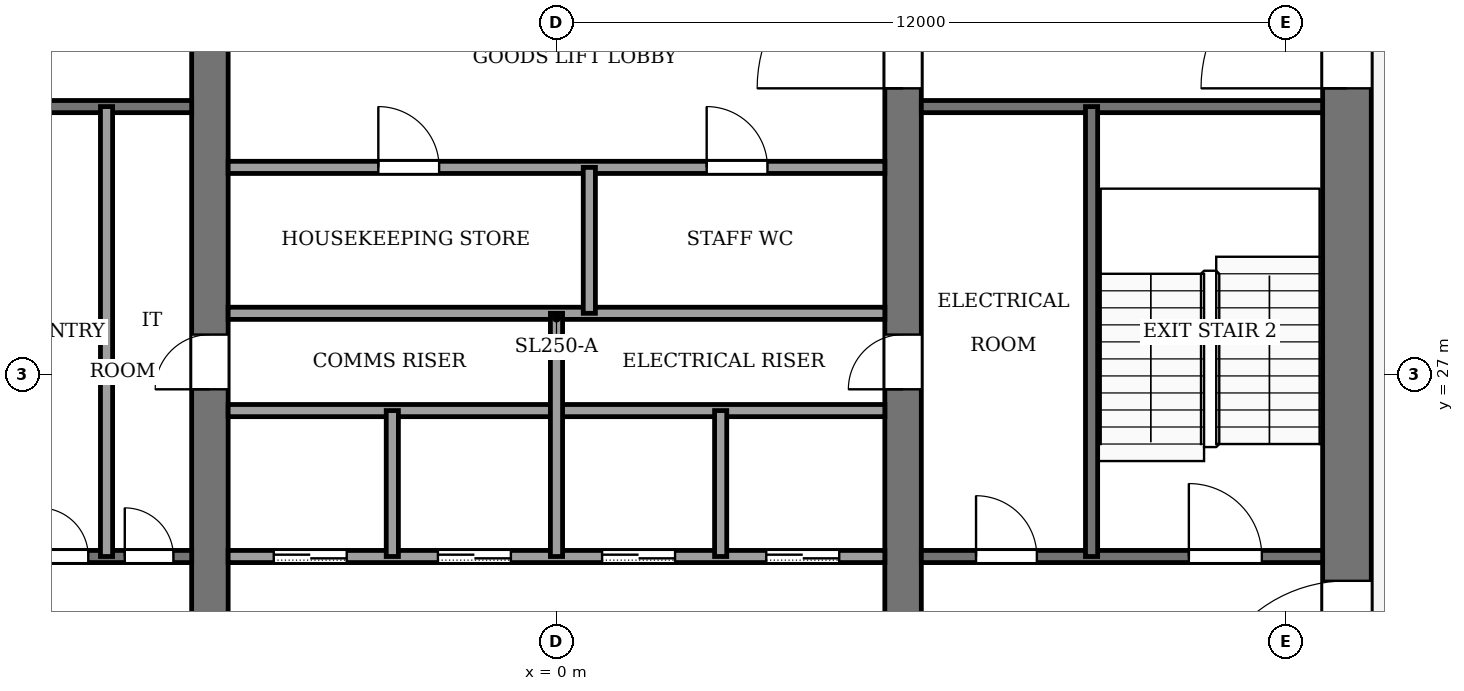
"""IFC4 building model, lengths in metres.
Left out: names, types, materials, properties, quantities, classifications, styles, units other than length and angle.
Written with IfcOpenShell. Run it as: python <this file> out.ifc"""

import sys

from ifc_helpers import new_model, si_unit, direction, frame, frame_2d, origin, place, context, subcontext, project, spatial, rectangle, extrude, element, fill, save


model = new_model("IFC4")
c1 = context("Model", 3, precision=1e-05, world=origin(), true_north=direction((0.0, 1.0)))
c2 = subcontext(c1, "Body", "Model", "MODEL_VIEW")
j1 = project(units=[si_unit("LENGTHUNIT", "METRE"), si_unit("PLANEANGLEUNIT", "RADIAN")], contexts=[c1])
p1 = place(None, origin())
s1 = spatial("IfcSite", under=j1, at=p1, CompositionType="ELEMENT")
p2 = place(p1, origin())
s2 = spatial("IfcBuilding", under=s1, at=p2, CompositionType="ELEMENT")
p3 = place(p2, frame((0.0, 0.0, 242.0)))
s3 = spatial("IfcBuildingStorey", under=s2, at=p3, CompositionType="ELEMENT", Elevation=242.0)
p4 = place(p3, frame((13.0, 18.4, -0.13), z_axis=(0.0, 0.0, 1.0), x_axis=(0.0, 1.0, 0.0)))
e1 = element("IfcWall", 1, at=p4, inside=s3, PredefinedType="SHEAR", context=c2, shape_type="SweptSolid", body=[
    extrude(rectangle(XDim=19.2, YDim=0.8, at=frame_2d((9.6, 0.0))), origin(), (0.0, 0.0, 1.0), 4.0),
])
p5 = place(p4, frame((2.8, 0.0, 0.13)))
e2 = element("IfcOpeningElement", 2, at=p5, cuts=e1, PredefinedType="OPENING", context=c2, shape_type="SweptSolid", body=[
    extrude(rectangle(XDim=2.4, YDim=2.4, at=frame_2d((1.2, 1.2))), frame((0.0, 0.41, 0.0), z_axis=(0.0, -1.0, 0.0), x_axis=(1.0, 0.0, 0.0)), (0.0, 0.0, 1.0), 0.82),
])
p6 = place(p4, frame((13.3, 0.0, 0.13)))
e3 = element("IfcOpeningElement", 3, at=p6, cuts=e1, PredefinedType="OPENING", context=c2, shape_type="SweptSolid", body=[
    extrude(rectangle(XDim=2.4, YDim=2.4, at=frame_2d((1.2, 1.2))), frame((0.0, 0.41, 0.0), z_axis=(0.0, -1.0, 0.0), x_axis=(1.0, 0.0, 0.0)), (0.0, 0.0, 1.0), 0.82),
])
p7 = place(p3, frame((-5.7, 18.4, -0.13), z_axis=(0.0, 0.0, 1.0), x_axis=(0.0, 1.0, 0.0)))
e4 = element("IfcWall", 4, at=p7, inside=s3, PredefinedType="SHEAR", context=c2, shape_type="SweptSolid", body=[
    extrude(rectangle(XDim=19.2, YDim=0.6, at=frame_2d((9.6, 0.0))), origin(), (0.0, 0.0, 1.0), 4.0),
])
p8 = place(p7, frame((8.35, 0.0, 0.13)))
e5 = element("IfcOpeningElement", 5, at=p8, cuts=e4, PredefinedType="OPENING", context=c2, shape_type="SweptSolid", body=[
    extrude(rectangle(XDim=0.9, YDim=2.1, at=frame_2d((0.45, 1.05))), frame((0.0, 0.31, 0.0), z_axis=(0.0, -1.0, 0.0), x_axis=(1.0, 0.0, 0.0)), (0.0, 0.0, 1.0), 0.62),
])
p9 = place(p3, frame((5.7, 18.4, -0.13), z_axis=(0.0, 0.0, 1.0), x_axis=(0.0, 1.0, 0.0)))
e6 = element("IfcWall", 6, at=p9, inside=s3, PredefinedType="SHEAR", context=c2, shape_type="SweptSolid", body=[
    extrude(rectangle(XDim=19.2, YDim=0.6, at=frame_2d((9.6, 0.0))), origin(), (0.0, 0.0, 1.0), 4.0),
])
p10 = place(p9, frame((8.35, 0.0, 0.13)))
e7 = element("IfcOpeningElement", 7, at=p10, cuts=e6, PredefinedType="OPENING", context=c2, shape_type="SweptSolid", body=[
    extrude(rectangle(XDim=0.9, YDim=2.1, at=frame_2d((0.45, 1.05))), frame((0.0, 0.31, 0.0), z_axis=(0.0, -1.0, 0.0), x_axis=(1.0, 0.0, 0.0)), (0.0, 0.0, 1.0), 0.62),
])
p11 = place(p9, frame((13.3, 0.0, 0.13)))
e8 = element("IfcOpeningElement", 8, at=p11, cuts=e6, PredefinedType="OPENING", context=c2, shape_type="SweptSolid", body=[
    extrude(rectangle(XDim=2.4, YDim=2.4, at=frame_2d((1.2, 1.2))), frame((0.0, 0.31, 0.0), z_axis=(0.0, -1.0, 0.0), x_axis=(1.0, 0.0, 0.0)), (0.0, 0.0, 1.0), 0.62),
])
p12 = place(p3, frame((-12.6, 24.0, 0.0), z_axis=(0.0, 0.0, 1.0), x_axis=(1.0, 0.0, 0.0)))
e9 = element("IfcWall", 9, at=p12, inside=s3, PredefinedType="PARTITIONING", context=c2, shape_type="SweptSolid", body=[
    extrude(rectangle(XDim=6.6, YDim=0.2, at=frame_2d((3.3, 0.0))), origin(), (0.0, 0.0, 1.0), 3.87),
])
p13 = place(p12, frame((4.1, 0.0, 0.0)))
e10 = element("IfcOpeningElement", 10, at=p13, cuts=e9, PredefinedType="OPENING", context=c2, shape_type="SweptSolid", body=[
    extrude(rectangle(XDim=0.8, YDim=2.1, at=frame_2d((0.4, 1.05))), frame((0.0, 0.11, 0.0), z_axis=(0.0, -1.0, 0.0), x_axis=(1.0, 0.0, 0.0)), (0.0, 0.0, 1.0), 0.22),
])
p14 = place(p12, frame((5.5, 0.0, 0.0)))
e11 = element("IfcOpeningElement", 11, at=p14, cuts=e9, PredefinedType="OPENING", context=c2, shape_type="SweptSolid", body=[
    extrude(rectangle(XDim=0.8, YDim=2.1, at=frame_2d((0.4, 1.05))), frame((0.0, 0.11, 0.0), z_axis=(0.0, -1.0, 0.0), x_axis=(1.0, 0.0, 0.0)), (0.0, 0.0, 1.0), 0.22),
])
p15 = place(p3, frame((-5.4, 24.0, 0.0), z_axis=(0.0, 0.0, 1.0), x_axis=(1.0, 0.0, 0.0)))
e12 = element("IfcWall", 12, at=p15, inside=s3, PredefinedType="PARTITIONING", context=c2, shape_type="SweptSolid", body=[
    extrude(rectangle(XDim=10.8, YDim=0.2, at=frame_2d((5.4, 0.0))), origin(), (0.0, 0.0, 1.0), 3.87),
])
p16 = place(p15, frame((0.75, 0.0, 0.0)))
e13 = element("IfcOpeningElement", 13, at=p16, cuts=e12, PredefinedType="OPENING", context=c2, shape_type="SweptSolid", body=[
    extrude(rectangle(XDim=1.2, YDim=2.2, at=frame_2d((0.6, 1.1))), frame((0.0, 0.11, 0.0), z_axis=(0.0, -1.0, 0.0), x_axis=(1.0, 0.0, 0.0)), (0.0, 0.0, 1.0), 0.22),
])
p17 = place(p15, frame((3.45, 0.0, 0.0)))
e14 = element("IfcOpeningElement", 14, at=p17, cuts=e12, PredefinedType="OPENING", context=c2, shape_type="SweptSolid", body=[
    extrude(rectangle(XDim=1.2, YDim=2.2, at=frame_2d((0.6, 1.1))), frame((0.0, 0.11, 0.0), z_axis=(0.0, -1.0, 0.0), x_axis=(1.0, 0.0, 0.0)), (0.0, 0.0, 1.0), 0.22),
])
p18 = place(p15, frame((6.15, 0.0, 0.0)))
e15 = element("IfcOpeningElement", 15, at=p18, cuts=e12, PredefinedType="OPENING", context=c2, shape_type="SweptSolid", body=[
    extrude(rectangle(XDim=1.2, YDim=2.2, at=frame_2d((0.6, 1.1))), frame((0.0, 0.11, 0.0), z_axis=(0.0, -1.0, 0.0), x_axis=(1.0, 0.0, 0.0)), (0.0, 0.0, 1.0), 0.22),
])
p19 = place(p15, frame((8.85, 0.0, 0.0)))
e16 = element("IfcOpeningElement", 16, at=p19, cuts=e12, PredefinedType="OPENING", context=c2, shape_type="SweptSolid", body=[
    extrude(rectangle(XDim=1.2, YDim=2.2, at=frame_2d((0.6, 1.1))), frame((0.0, 0.11, 0.0), z_axis=(0.0, -1.0, 0.0), x_axis=(1.0, 0.0, 0.0)), (0.0, 0.0, 1.0), 0.22),
])
p20 = place(p3, frame((6.0, 24.0, 0.0), z_axis=(0.0, 0.0, 1.0), x_axis=(1.0, 0.0, 0.0)))
e17 = element("IfcWall", 17, at=p20, inside=s3, PredefinedType="PARTITIONING", context=c2, shape_type="SweptSolid", body=[
    extrude(rectangle(XDim=6.6, YDim=0.2, at=frame_2d((3.3, 0.0))), origin(), (0.0, 0.0, 1.0), 3.87),
])
p21 = place(p20, frame((0.9, 0.0, 0.0)))
e18 = element("IfcOpeningElement", 18, at=p21, cuts=e17, PredefinedType="OPENING", context=c2, shape_type="SweptSolid", body=[
    extrude(rectangle(XDim=1.0, YDim=2.1, at=frame_2d((0.5, 1.05))), frame((0.0, 0.11, 0.0), z_axis=(0.0, -1.0, 0.0), x_axis=(1.0, 0.0, 0.0)), (0.0, 0.0, 1.0), 0.22),
])
p22 = place(p20, frame((4.4, 0.0, 0.0)))
e19 = element("IfcOpeningElement", 19, at=p22, cuts=e17, PredefinedType="OPENING", context=c2, shape_type="SweptSolid", body=[
    extrude(rectangle(XDim=1.2, YDim=2.2, at=frame_2d((0.6, 1.1))), frame((0.0, 0.11, 0.0), z_axis=(0.0, -1.0, 0.0), x_axis=(1.0, 0.0, 0.0)), (0.0, 0.0, 1.0), 0.22),
])
for number, where, z_axis, x_axis in (
    (20, (-5.4, 26.4, 0.0), (0.0, 0.0, 1.0), (1.0, 0.0, 0.0)),
    (21, (-5.4, 28.0, 0.0), (0.0, 0.0, 1.0), (1.0, 0.0, 0.0)),
):
    element("IfcWall", number, at=place(p3, frame(where, z_axis=z_axis, x_axis=x_axis)), inside=s3, PredefinedType="PARTITIONING", context=c2, shape_type="SweptSolid", body=[
        extrude(rectangle(XDim=10.8, YDim=0.2, at=frame_2d((5.4, 0.0))), origin(), (0.0, 0.0, 1.0), 3.87),
    ])
p23 = place(p3, frame((-5.4, 30.4, 0.0), z_axis=(0.0, 0.0, 1.0), x_axis=(1.0, 0.0, 0.0)))
e22 = element("IfcWall", 22, at=p23, inside=s3, PredefinedType="PARTITIONING", context=c2, shape_type="SweptSolid", body=[
    extrude(rectangle(XDim=10.8, YDim=0.2, at=frame_2d((5.4, 0.0))), origin(), (0.0, 0.0, 1.0), 3.87),
])
p24 = place(p23, frame((2.47, 0.0, 0.0)))
e23 = element("IfcOpeningElement", 23, at=p24, cuts=e22, PredefinedType="OPENING", context=c2, shape_type="SweptSolid", body=[
    extrude(rectangle(XDim=1.0, YDim=2.1, at=frame_2d((0.5, 1.05))), frame((0.0, 0.11, 0.0), z_axis=(0.0, -1.0, 0.0), x_axis=(1.0, 0.0, 0.0)), (0.0, 0.0, 1.0), 0.22),
])
p25 = place(p23, frame((7.87, 0.0, 0.0)))
e24 = element("IfcOpeningElement", 24, at=p25, cuts=e22, PredefinedType="OPENING", context=c2, shape_type="SweptSolid", body=[
    extrude(rectangle(XDim=1.0, YDim=2.1, at=frame_2d((0.5, 1.05))), frame((0.0, 0.11, 0.0), z_axis=(0.0, -1.0, 0.0), x_axis=(1.0, 0.0, 0.0)), (0.0, 0.0, 1.0), 0.22),
])
p26 = place(p3, frame((-12.6, 31.4, 0.0), z_axis=(0.0, 0.0, 1.0), x_axis=(1.0, 0.0, 0.0)))
e25 = element("IfcWall", 25, at=p26, inside=s3, PredefinedType="PARTITIONING", context=c2, shape_type="SweptSolid", body=[
    extrude(rectangle(XDim=6.6, YDim=0.2, at=frame_2d((3.3, 0.0))), origin(), (0.0, 0.0, 1.0), 3.87),
])
p27 = place(p26, frame((1.0, 0.0, 0.0)))
e26 = element("IfcOpeningElement", 26, at=p27, cuts=e25, PredefinedType="OPENING", context=c2, shape_type="SweptSolid", body=[
    extrude(rectangle(XDim=1.2, YDim=2.2, at=frame_2d((0.6, 1.1))), frame((0.0, 0.11, 0.0), z_axis=(0.0, -1.0, 0.0), x_axis=(1.0, 0.0, 0.0)), (0.0, 0.0, 1.0), 0.22),
])
p28 = place(p3, frame((6.0, 31.4, 0.0), z_axis=(0.0, 0.0, 1.0), x_axis=(1.0, 0.0, 0.0)))
e27 = element("IfcWall", 27, at=p28, inside=s3, PredefinedType="PARTITIONING", context=c2, shape_type="SweptSolid", body=[
    extrude(rectangle(XDim=6.6, YDim=0.2, at=frame_2d((3.3, 0.0))), origin(), (0.0, 0.0, 1.0), 3.87),
])
p29 = place(p3, frame((-7.4, 24.0, 0.0), z_axis=(0.0, 0.0, 1.0), x_axis=(0.0, 1.0, 0.0)))
e28 = element("IfcWall", 28, at=p29, inside=s3, PredefinedType="PARTITIONING", context=c2, shape_type="SweptSolid", body=[
    extrude(rectangle(XDim=7.4, YDim=0.2, at=frame_2d((3.7, 0.0))), origin(), (0.0, 0.0, 1.0), 3.87),
])
p30 = place(p3, frame((-2.7, 24.0, 0.0), z_axis=(0.0, 0.0, 1.0), x_axis=(0.0, 1.0, 0.0)))
e29 = element("IfcWall", 29, at=p30, inside=s3, PredefinedType="PARTITIONING", context=c2, shape_type="SweptSolid", body=[
    extrude(rectangle(XDim=2.4, YDim=0.2, at=frame_2d((1.2, 0.0))), origin(), (0.0, 0.0, 1.0), 3.87),
])
p31 = place(p3, frame((0.0, 24.0, 0.0), z_axis=(0.0, 0.0, 1.0), x_axis=(0.0, 1.0, 0.0)))
e30 = element("IfcWall", 30, at=p31, inside=s3, PredefinedType="PARTITIONING", context=c2, shape_type="SweptSolid", body=[
    extrude(rectangle(XDim=4.0, YDim=0.2, at=frame_2d((2.0, 0.0))), origin(), (0.0, 0.0, 1.0), 3.87),
])
for number, where, z_axis, x_axis in (
    (31, (0.54, 28.0, 0.0), (0.0, 0.0, 1.0), (0.0, 1.0, 0.0)),
    (32, (2.7, 24.0, 0.0), (0.0, 0.0, 1.0), (0.0, 1.0, 0.0)),
):
    element("IfcWall", number, at=place(p3, frame(where, z_axis=z_axis, x_axis=x_axis)), inside=s3, PredefinedType="PARTITIONING", context=c2, shape_type="SweptSolid", body=[
        extrude(rectangle(XDim=2.4, YDim=0.2, at=frame_2d((1.2, 0.0))), origin(), (0.0, 0.0, 1.0), 3.87),
    ])
p32 = place(p3, frame((8.8, 24.0, 0.0), z_axis=(0.0, 0.0, 1.0), x_axis=(0.0, 1.0, 0.0)))
e33 = element("IfcWall", 33, at=p32, inside=s3, PredefinedType="PARTITIONING", context=c2, shape_type="SweptSolid", body=[
    extrude(rectangle(XDim=7.4, YDim=0.2, at=frame_2d((3.7, 0.0))), origin(), (0.0, 0.0, 1.0), 3.87),
])
p33 = place(p16, origin())
e34 = element("IfcDoor", 34, at=p33, inside=s3, OperationType="SLIDING_TO_LEFT", PredefinedType="DOOR", context=c2, shape_type="SweptSolid", body=[
    extrude(rectangle(XDim=1.2, YDim=2.2, at=frame_2d((0.6, 1.1))), frame((0.0, 0.025, 0.0), z_axis=(0.0, -1.0, 0.0), x_axis=(1.0, 0.0, 0.0)), (0.0, 0.0, 1.0), 0.05),
])
fill(e13, e34)
p34 = place(p17, origin())
e35 = element("IfcDoor", 35, at=p34, inside=s3, OperationType="SLIDING_TO_LEFT", PredefinedType="DOOR", context=c2, shape_type="SweptSolid", body=[
    extrude(rectangle(XDim=1.2, YDim=2.2, at=frame_2d((0.6, 1.1))), frame((0.0, 0.025, 0.0), z_axis=(0.0, -1.0, 0.0), x_axis=(1.0, 0.0, 0.0)), (0.0, 0.0, 1.0), 0.05),
])
fill(e14, e35)
p35 = place(p18, origin())
e36 = element("IfcDoor", 36, at=p35, inside=s3, OperationType="SLIDING_TO_LEFT", PredefinedType="DOOR", context=c2, shape_type="SweptSolid", body=[
    extrude(rectangle(XDim=1.2, YDim=2.2, at=frame_2d((0.6, 1.1))), frame((0.0, 0.025, 0.0), z_axis=(0.0, -1.0, 0.0), x_axis=(1.0, 0.0, 0.0)), (0.0, 0.0, 1.0), 0.05),
])
fill(e15, e36)
p36 = place(p19, origin())
e37 = element("IfcDoor", 37, at=p36, inside=s3, OperationType="SLIDING_TO_LEFT", PredefinedType="DOOR", context=c2, shape_type="SweptSolid", body=[
    extrude(rectangle(XDim=1.2, YDim=2.2, at=frame_2d((0.6, 1.1))), frame((0.0, 0.025, 0.0), z_axis=(0.0, -1.0, 0.0), x_axis=(1.0, 0.0, 0.0)), (0.0, 0.0, 1.0), 0.05),
])
fill(e16, e37)
p37 = place(p24, origin())
e38 = element("IfcDoor", 38, at=p37, inside=s3, OperationType="SINGLE_SWING_RIGHT", PredefinedType="DOOR", context=c2, shape_type="SweptSolid", body=[
    extrude(rectangle(XDim=1.0, YDim=2.1, at=frame_2d((0.5, 1.05))), frame((0.0, 0.025, 0.0), z_axis=(0.0, -1.0, 0.0), x_axis=(1.0, 0.0, 0.0)), (0.0, 0.0, 1.0), 0.05),
])
fill(e23, e38)
p38 = place(p25, origin())
e39 = element("IfcDoor", 39, at=p38, inside=s3, OperationType="SINGLE_SWING_LEFT", PredefinedType="DOOR", context=c2, shape_type="SweptSolid", body=[
    extrude(rectangle(XDim=1.0, YDim=2.1, at=frame_2d((0.5, 1.05))), frame((0.0, 0.025, 0.0), z_axis=(0.0, -1.0, 0.0), x_axis=(1.0, 0.0, 0.0)), (0.0, 0.0, 1.0), 0.05),
])
fill(e24, e39)
p39 = place(p13, origin())
e40 = element("IfcDoor", 40, at=p39, inside=s3, OperationType="SINGLE_SWING_LEFT", PredefinedType="DOOR", context=c2, shape_type="SweptSolid", body=[
    extrude(rectangle(XDim=0.8, YDim=2.1, at=frame_2d((0.4, 1.05))), frame((0.0, 0.025, 0.0), z_axis=(0.0, -1.0, 0.0), x_axis=(1.0, 0.0, 0.0)), (0.0, 0.0, 1.0), 0.05),
])
fill(e10, e40)
p40 = place(p14, origin())
e41 = element("IfcDoor", 41, at=p40, inside=s3, OperationType="SINGLE_SWING_RIGHT", PredefinedType="DOOR", context=c2, shape_type="SweptSolid", body=[
    extrude(rectangle(XDim=0.8, YDim=2.1, at=frame_2d((0.4, 1.05))), frame((0.0, 0.025, 0.0), z_axis=(0.0, -1.0, 0.0), x_axis=(1.0, 0.0, 0.0)), (0.0, 0.0, 1.0), 0.05),
])
fill(e11, e41)
p41 = place(p21, origin())
e42 = element("IfcDoor", 42, at=p41, inside=s3, OperationType="SINGLE_SWING_RIGHT", PredefinedType="DOOR", context=c2, shape_type="SweptSolid", body=[
    extrude(rectangle(XDim=1.0, YDim=2.1, at=frame_2d((0.5, 1.05))), frame((0.0, 0.025, 0.0), z_axis=(0.0, -1.0, 0.0), x_axis=(1.0, 0.0, 0.0)), (0.0, 0.0, 1.0), 0.05),
])
fill(e18, e42)
p42 = place(p8, origin())
e43 = element("IfcDoor", 43, at=p42, inside=s3, OperationType="SINGLE_SWING_LEFT", PredefinedType="DOOR", context=c2, shape_type="SweptSolid", body=[
    extrude(rectangle(XDim=0.9, YDim=2.1, at=frame_2d((0.45, 1.05))), frame((0.0, 0.025, 0.0), z_axis=(0.0, -1.0, 0.0), x_axis=(1.0, 0.0, 0.0)), (0.0, 0.0, 1.0), 0.05),
])
fill(e5, e43)
p43 = place(p10, origin())
e44 = element("IfcDoor", 44, at=p43, inside=s3, OperationType="SINGLE_SWING_RIGHT", PredefinedType="DOOR", context=c2, shape_type="SweptSolid", body=[
    extrude(rectangle(XDim=0.9, YDim=2.1, at=frame_2d((0.45, 1.05))), frame((0.0, 0.025, 0.0), z_axis=(0.0, -1.0, 0.0), x_axis=(1.0, 0.0, 0.0)), (0.0, 0.0, 1.0), 0.05),
])
fill(e7, e44)
p44 = place(p22, origin())
e45 = element("IfcDoor", 45, at=p44, inside=s3, OperationType="SINGLE_SWING_LEFT", PredefinedType="DOOR", context=c2, shape_type="SweptSolid", body=[
    extrude(rectangle(XDim=1.2, YDim=2.2, at=frame_2d((0.6, 1.1))), frame((0.0, 0.025, 0.0), z_axis=(0.0, -1.0, 0.0), x_axis=(1.0, 0.0, 0.0)), (0.0, 0.0, 1.0), 0.05),
])
fill(e19, e45)
p45 = place(p11, origin())
e46 = element("IfcDoor", 46, at=p45, inside=s3, OperationType="DOUBLE_DOOR_SINGLE_SWING", PredefinedType="DOOR", context=c2, shape_type="SweptSolid", body=[
    extrude(rectangle(XDim=2.4, YDim=2.4, at=frame_2d((1.2, 1.2))), frame((0.0, 0.025, 0.0), z_axis=(0.0, -1.0, 0.0), x_axis=(1.0, 0.0, 0.0)), (0.0, 0.0, 1.0), 0.05),
])
fill(e8, e46)
p46 = place(p5, origin())
e47 = element("IfcDoor", 47, at=p46, inside=s3, OperationType="DOUBLE_DOOR_SINGLE_SWING", PredefinedType="DOOR", context=c2, shape_type="SweptSolid", body=[
    extrude(rectangle(XDim=2.4, YDim=2.4, at=frame_2d((1.2, 1.2))), frame((0.0, 0.025, 0.0), z_axis=(0.0, -1.0, 0.0), x_axis=(1.0, 0.0, 0.0)), (0.0, 0.0, 1.0), 0.05),
])
fill(e2, e47)
p47 = place(p6, origin())
e48 = element("IfcDoor", 48, at=p47, inside=s3, OperationType="DOUBLE_DOOR_SINGLE_SWING", PredefinedType="DOOR", context=c2, shape_type="SweptSolid", body=[
    extrude(rectangle(XDim=2.4, YDim=2.4, at=frame_2d((1.2, 1.2))), frame((0.0, 0.025, 0.0), z_axis=(0.0, -1.0, 0.0), x_axis=(1.0, 0.0, 0.0)), (0.0, 0.0, 1.0), 0.05),
])
fill(e3, e48)
save(model, sys.argv[1])
